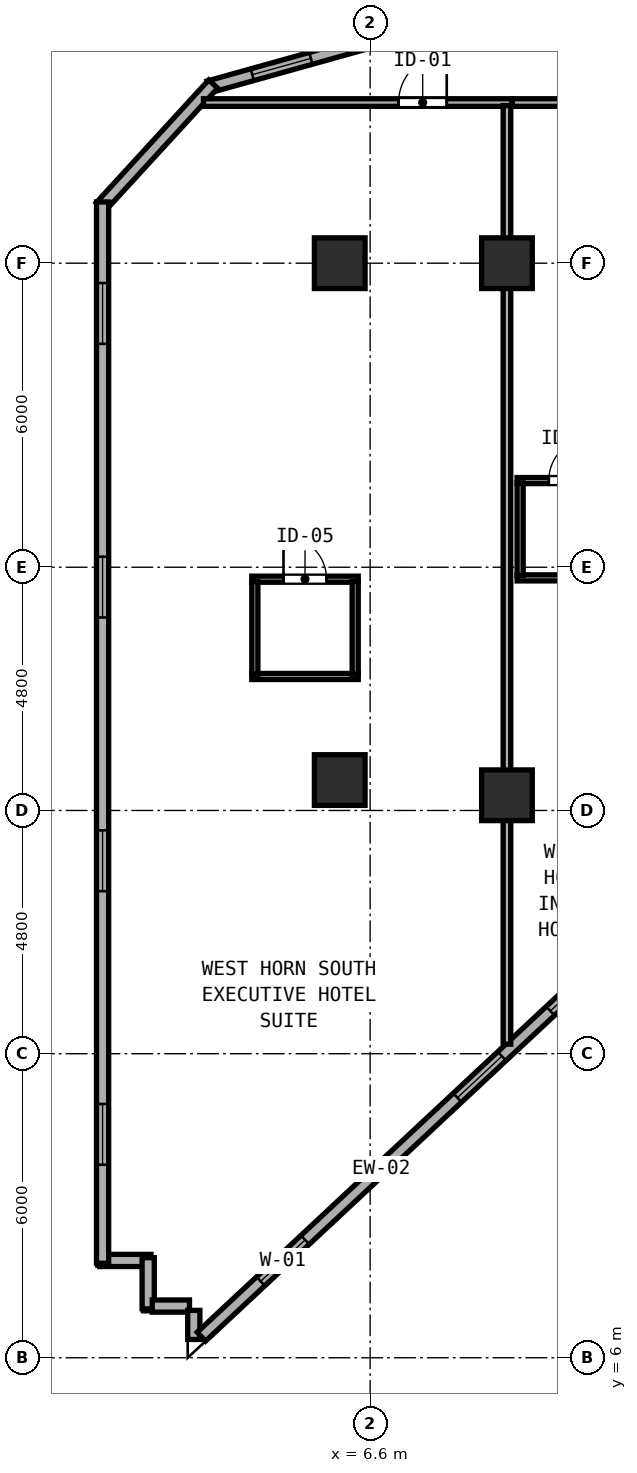
"""IFC4 building model, lengths in metres.
Left out: names, types, materials, properties, quantities, classifications, styles, units other than length and angle.
Written with IfcOpenShell. Run it as: python <this file> out.ifc"""

import sys

from ifc_helpers import new_model, si_unit, direction, frame, frame_2d, origin, origin_2d, place, context, subcontext, project, spatial, rectangle, hollow_rectangle, extrude, element, fill, save


model = new_model("IFC4")
c1 = context("Model", 3, precision=1e-05, world=origin(), true_north=direction((0.0, 1.0)))
c2 = subcontext(c1, "Body", "Model", "MODEL_VIEW")
j1 = project(units=[si_unit("LENGTHUNIT", "METRE"), si_unit("PLANEANGLEUNIT", "RADIAN")], contexts=[c1])
p1 = place(None, origin())
s1 = spatial("IfcSite", under=j1, at=p1, CompositionType="ELEMENT")
p2 = place(p1, origin())
s2 = spatial("IfcBuilding", under=s1, at=p2, CompositionType="ELEMENT")
p3 = place(p2, frame((0.0, 0.0, 78.0)))
s3 = spatial("IfcBuildingStorey", under=s2, at=p3, CompositionType="ELEMENT", Elevation=78.0)
for number, where, z_axis, x_axis in (
    (1, (6.0, 17.4, 0.0), (0.0, 0.0, 1.0), (1.0, 0.0, 0.0)),
    (2, (6.0, 27.6, 0.0), (0.0, 0.0, 1.0), (1.0, 0.0, 0.0)),
    (3, (9.3, 17.1, 0.0), (0.0, 0.0, 1.0), (1.0, 0.0, 0.0)),
    (4, (9.3, 27.6, 0.0), (0.0, 0.0, 1.0), (1.0, 0.0, 0.0)),
):
    element("IfcColumn", number, at=place(p3, frame(where, z_axis=z_axis, x_axis=x_axis)), inside=s3, PredefinedType="COLUMN", context=c2, shape_type="SweptSolid", body=[
        extrude(hollow_rectangle(XDim=1.0, YDim=1.0, WallThickness=0.038, at=origin_2d()), origin(), (0.0, 0.0, 1.0), 3.8),
    ])
for number, where, z_axis, x_axis in (
    (5, (1.265, 7.92, 0.0), (0.0, 0.0, 1.0), (1.0, 0.0, 0.0)),
    (6, (2.22, 7.975, 0.0), (0.0, 0.0, 1.0), (0.0, -1.0, 0.0)),
):
    element("IfcWall", number, at=place(p3, frame(where, z_axis=z_axis, x_axis=x_axis)), inside=s3, PredefinedType="SOLIDWALL", context=c2, shape_type="SweptSolid", body=[
        extrude(rectangle(XDim=1.01, YDim=0.24, at=frame_2d((0.505, 0.0))), origin(), (0.0, 0.0, 1.0), 3.6),
    ])
p4 = place(p3, frame((2.3, 7.02, 0.0), z_axis=(0.0, 0.0, 1.0), x_axis=(1.0, 0.0, 0.0)))
e7 = element("IfcWall", 7, at=p4, inside=s3, PredefinedType="SOLIDWALL", context=c2, shape_type="SweptSolid", body=[
    extrude(rectangle(XDim=0.735, YDim=0.24, at=frame_2d((0.367, 0.0))), origin(), (0.0, 0.0, 1.0), 3.6),
])
p5 = place(p3, frame((3.12, 6.935, 0.0), z_axis=(0.0, 0.0, 1.0), x_axis=(0.0, -1.0, 0.0)))
e8 = element("IfcWall", 8, at=p5, inside=s3, PredefinedType="SOLIDWALL", context=c2, shape_type="SweptSolid", body=[
    extrude(rectangle(XDim=0.574, YDim=0.24, at=frame_2d((0.287, 0.0))), origin(), (0.0, 0.0, 1.0), 3.6),
])
p6 = place(p3, frame((3.27, 6.416, 0.0), z_axis=(0.0, 0.0, 1.0), x_axis=(0.731064187858, 0.682308693505, 0.0)))
e9 = element("IfcWall", 9, at=p6, inside=s3, PredefinedType="SOLIDWALL", context=c2, shape_type="SweptSolid", body=[
    extrude(rectangle(XDim=11.833, YDim=0.24, at=frame_2d((5.916, 0.0))), origin(), (0.0, 0.0, 1.0), 3.6),
])
p7 = place(p6, frame((1.6, 0.0, 0.85)))
e10 = element("IfcOpeningElement", 10, at=p7, cuts=e9, PredefinedType="OPENING", context=c2, shape_type="SweptSolid", body=[
    extrude(rectangle(XDim=1.2, YDim=1.85, at=frame_2d((0.6, 0.925))), frame((0.0, 0.13, 0.0), z_axis=(0.0, -1.0, 0.0), x_axis=(1.0, 0.0, 0.0)), (0.0, 0.0, 1.0), 0.26),
])
p8 = place(p6, frame((6.912, 0.0, 0.85)))
e11 = element("IfcOpeningElement", 11, at=p8, cuts=e9, PredefinedType="OPENING", context=c2, shape_type="SweptSolid", body=[
    extrude(rectangle(XDim=1.2, YDim=1.85, at=frame_2d((0.6, 0.925))), frame((0.0, 0.13, 0.0), z_axis=(0.0, -1.0, 0.0), x_axis=(1.0, 0.0, 0.0)), (0.0, 0.0, 1.0), 0.26),
])
p9 = place(p6, frame((9.421, 0.0, 0.85)))
e12 = element("IfcOpeningElement", 12, at=p9, cuts=e9, PredefinedType="OPENING", context=c2, shape_type="SweptSolid", body=[
    extrude(rectangle(XDim=1.2, YDim=1.85, at=frame_2d((0.6, 0.925))), frame((0.0, 0.13, 0.0), z_axis=(0.0, -1.0, 0.0), x_axis=(1.0, 0.0, 0.0)), (0.0, 0.0, 1.0), 0.26),
])
p10 = place(p3, frame((12.173, 33.524, 0.0), z_axis=(0.0, 0.0, 1.0), x_axis=(-0.963197271032, -0.268795493036, 0.0)))
e13 = element("IfcWall", 13, at=p10, inside=s3, PredefinedType="SOLIDWALL", context=c2, shape_type="SweptSolid", body=[
    extrude(rectangle(XDim=9.095, YDim=0.24, at=frame_2d((4.548, 0.0))), origin(), (0.0, 0.0, 1.0), 3.6),
])
p11 = place(p10, frame((1.6, 0.0, 0.85)))
e14 = element("IfcOpeningElement", 14, at=p11, cuts=e13, PredefinedType="OPENING", context=c2, shape_type="SweptSolid", body=[
    extrude(rectangle(XDim=1.2, YDim=1.85, at=frame_2d((0.6, 0.925))), frame((0.0, 0.13, 0.0), z_axis=(0.0, -1.0, 0.0), x_axis=(1.0, 0.0, 0.0)), (0.0, 0.0, 1.0), 0.26),
])
p12 = place(p10, frame((7.0, 0.0, 0.85)))
e15 = element("IfcOpeningElement", 15, at=p12, cuts=e13, PredefinedType="OPENING", context=c2, shape_type="SweptSolid", body=[
    extrude(rectangle(XDim=1.2, YDim=1.85, at=frame_2d((0.6, 0.925))), frame((0.0, 0.13, 0.0), z_axis=(0.0, -1.0, 0.0), x_axis=(1.0, 0.0, 0.0)), (0.0, 0.0, 1.0), 0.26),
])
p13 = place(p3, frame((3.502, 31.134, 0.0), z_axis=(0.0, 0.0, 1.0), x_axis=(-0.675781844312, -0.737101688302, 0.0)))
e16 = element("IfcWall", 16, at=p13, inside=s3, PredefinedType="SOLIDWALL", context=c2, shape_type="SweptSolid", body=[
    extrude(rectangle(XDim=3.285, YDim=0.24, at=frame_2d((1.642, 0.0))), origin(), (0.0, 0.0, 1.0), 3.6),
])
p14 = place(p3, frame((1.32, 28.808, 0.0), z_axis=(0.0, 0.0, 1.0), x_axis=(0.0, -1.0, 0.0)))
e17 = element("IfcWall", 17, at=p14, inside=s3, PredefinedType="SOLIDWALL", context=c2, shape_type="SweptSolid", body=[
    extrude(rectangle(XDim=20.943, YDim=0.24, at=frame_2d((10.472, 0.0))), origin(), (0.0, 0.0, 1.0), 3.6),
])
p15 = place(p14, frame((1.6, 0.0, 0.85)))
e18 = element("IfcOpeningElement", 18, at=p15, cuts=e17, PredefinedType="OPENING", context=c2, shape_type="SweptSolid", body=[
    extrude(rectangle(XDim=1.2, YDim=1.85, at=frame_2d((0.6, 0.925))), frame((0.0, 0.13, 0.0), z_axis=(0.0, -1.0, 0.0), x_axis=(1.0, 0.0, 0.0)), (0.0, 0.0, 1.0), 0.26),
])
p16 = place(p14, frame((7.0, 0.0, 0.85)))
e19 = element("IfcOpeningElement", 19, at=p16, cuts=e17, PredefinedType="OPENING", context=c2, shape_type="SweptSolid", body=[
    extrude(rectangle(XDim=1.2, YDim=1.85, at=frame_2d((0.6, 0.925))), frame((0.0, 0.13, 0.0), z_axis=(0.0, -1.0, 0.0), x_axis=(1.0, 0.0, 0.0)), (0.0, 0.0, 1.0), 0.26),
])
p17 = place(p14, frame((12.4, 0.0, 0.85)))
e20 = element("IfcOpeningElement", 20, at=p17, cuts=e17, PredefinedType="OPENING", context=c2, shape_type="SweptSolid", body=[
    extrude(rectangle(XDim=1.2, YDim=1.85, at=frame_2d((0.6, 0.925))), frame((0.0, 0.13, 0.0), z_axis=(0.0, -1.0, 0.0), x_axis=(1.0, 0.0, 0.0)), (0.0, 0.0, 1.0), 0.26),
])
p18 = place(p14, frame((17.8, 0.0, 0.85)))
e21 = element("IfcOpeningElement", 21, at=p18, cuts=e17, PredefinedType="OPENING", context=c2, shape_type="SweptSolid", body=[
    extrude(rectangle(XDim=1.2, YDim=1.85, at=frame_2d((0.6, 0.925))), frame((0.0, 0.13, 0.0), z_axis=(0.0, -1.0, 0.0), x_axis=(1.0, 0.0, 0.0)), (0.0, 0.0, 1.0), 0.26),
])
p19 = place(p3, frame((3.311, 30.77, 0.0), z_axis=(0.0, 0.0, 1.0), x_axis=(1.0, 0.0, 0.0)))
e22 = element("IfcWall", 22, at=p19, inside=s3, PredefinedType="PARTITIONING", context=c2, shape_type="SweptSolid", body=[
    extrude(rectangle(XDim=6.089, YDim=0.15, at=frame_2d((3.044, 0.0))), origin(), (0.0, 0.0, 1.0), 3.6),
])
p20 = place(p19, frame((4.801, 0.0, 0.0), z_axis=(0.0, 0.0, 1.0), x_axis=(-1.0, 0.0, 0.0)))
e23 = element("IfcOpeningElement", 23, at=p20, cuts=e22, PredefinedType="OPENING", context=c2, shape_type="SweptSolid", body=[
    extrude(rectangle(XDim=0.95, YDim=2.18, at=frame_2d((0.475, 1.09))), frame((0.0, 0.085, 0.0), z_axis=(0.0, -1.0, 0.0), x_axis=(1.0, 0.0, 0.0)), (0.0, 0.0, 1.0), 0.17),
])
p21 = place(p3, frame((9.3, 12.188, 0.0), z_axis=(0.0, 0.0, 1.0), x_axis=(0.0, 1.0, 0.0)))
e24 = element("IfcWall", 24, at=p21, inside=s3, PredefinedType="PARTITIONING", context=c2, shape_type="SweptSolid", body=[
    extrude(rectangle(XDim=18.522, YDim=0.15, at=frame_2d((9.261, 0.0))), origin(), (0.0, 0.0, 1.0), 3.6),
])
p22 = place(p3, frame((4.265, 21.364, 0.0), z_axis=(0.0, 0.0, 1.0), x_axis=(1.0, 0.0, 0.0)))
e25 = element("IfcWall", 25, at=p22, inside=s3, PredefinedType="PARTITIONING", context=c2, shape_type="SweptSolid", body=[
    extrude(rectangle(XDim=2.1, YDim=0.12, at=frame_2d((1.05, 0.0))), origin(), (0.0, 0.0, 1.0), 3.6),
])
p23 = place(p22, frame((1.475, 0.0, 0.0), z_axis=(0.0, 0.0, 1.0), x_axis=(-1.0, 0.0, 0.0)))
e26 = element("IfcOpeningElement", 26, at=p23, cuts=e25, PredefinedType="OPENING", context=c2, shape_type="SweptSolid", body=[
    extrude(rectangle(XDim=0.85, YDim=2.1, at=frame_2d((0.425, 1.05))), frame((0.0, 0.07, 0.0), z_axis=(0.0, -1.0, 0.0), x_axis=(1.0, 0.0, 0.0)), (0.0, 0.0, 1.0), 0.14),
])
p24 = place(p3, frame((4.265, 19.444, 0.0), z_axis=(0.0, 0.0, 1.0), x_axis=(1.0, 0.0, 0.0)))
e27 = element("IfcWall", 27, at=p24, inside=s3, PredefinedType="PARTITIONING", context=c2, shape_type="SweptSolid", body=[
    extrude(rectangle(XDim=2.1, YDim=0.12, at=frame_2d((1.05, 0.0))), origin(), (0.0, 0.0, 1.0), 3.6),
])
for number, where, z_axis, x_axis in (
    (28, (4.325, 19.489, 0.0), (0.0, 0.0, 1.0), (0.0, 1.0, 0.0)),
    (29, (6.305, 19.489, 0.0), (0.0, 0.0, 1.0), (0.0, 1.0, 0.0)),
):
    element("IfcWall", number, at=place(p3, frame(where, z_axis=z_axis, x_axis=x_axis)), inside=s3, PredefinedType="PARTITIONING", context=c2, shape_type="SweptSolid", body=[
        extrude(rectangle(XDim=1.83, YDim=0.12, at=frame_2d((0.915, 0.0))), origin(), (0.0, 0.0, 1.0), 3.6),
    ])
p25 = place(p3, frame((9.402, 30.77, 0.0), z_axis=(0.0, 0.0, 1.0), x_axis=(1.0, 0.0, 0.0)))
e30 = element("IfcWall", 30, at=p25, inside=s3, PredefinedType="PARTITIONING", context=c2, shape_type="SweptSolid", body=[
    extrude(rectangle(XDim=2.296, YDim=0.15, at=frame_2d((1.148, 0.0))), origin(), (0.0, 0.0, 1.0), 3.6),
])
p26 = place(p25, frame((1.934, 0.0, 0.0), z_axis=(0.0, 0.0, 1.0), x_axis=(-1.0, 0.0, 0.0)))
e31 = element("IfcOpeningElement", 31, at=p26, cuts=e30, PredefinedType="OPENING", context=c2, shape_type="SweptSolid", body=[
    extrude(rectangle(XDim=0.95, YDim=2.15, at=frame_2d((0.475, 1.075))), frame((0.0, 0.085, 0.0), z_axis=(0.0, -1.0, 0.0), x_axis=(1.0, 0.0, 0.0)), (0.0, 0.0, 1.0), 0.17),
])
p27 = place(p3, frame((9.5, 23.31, 0.0), z_axis=(0.0, 0.0, 1.0), x_axis=(1.0, 0.0, 0.0)))
e32 = element("IfcWall", 32, at=p27, inside=s3, PredefinedType="PARTITIONING", context=c2, shape_type="SweptSolid", body=[
    extrude(rectangle(XDim=2.1, YDim=0.12, at=frame_2d((1.05, 0.0))), origin(), (0.0, 0.0, 1.0), 3.6),
])
p28 = place(p27, frame((1.475, 0.0, 0.0), z_axis=(0.0, 0.0, 1.0), x_axis=(-1.0, 0.0, 0.0)))
e33 = element("IfcOpeningElement", 33, at=p28, cuts=e32, PredefinedType="OPENING", context=c2, shape_type="SweptSolid", body=[
    extrude(rectangle(XDim=0.85, YDim=2.1, at=frame_2d((0.425, 1.05))), frame((0.0, 0.07, 0.0), z_axis=(0.0, -1.0, 0.0), x_axis=(1.0, 0.0, 0.0)), (0.0, 0.0, 1.0), 0.14),
])
p29 = place(p3, frame((9.5, 21.39, 0.0), z_axis=(0.0, 0.0, 1.0), x_axis=(1.0, 0.0, 0.0)))
e34 = element("IfcWall", 34, at=p29, inside=s3, PredefinedType="PARTITIONING", context=c2, shape_type="SweptSolid", body=[
    extrude(rectangle(XDim=2.1, YDim=0.12, at=frame_2d((1.05, 0.0))), origin(), (0.0, 0.0, 1.0), 3.6),
])
p30 = place(p3, frame((9.56, 21.435, 0.0), z_axis=(0.0, 0.0, 1.0), x_axis=(0.0, 1.0, 0.0)))
e35 = element("IfcWall", 35, at=p30, inside=s3, PredefinedType="PARTITIONING", context=c2, shape_type="SweptSolid", body=[
    extrude(rectangle(XDim=1.83, YDim=0.12, at=frame_2d((0.915, 0.0))), origin(), (0.0, 0.0, 1.0), 3.6),
])
p31 = place(p7, origin())
e36 = element("IfcWindow", 36, at=p31, inside=s3, PartitioningType="SINGLE_PANEL", PredefinedType="WINDOW", context=c2, shape_type="SweptSolid", body=[
    extrude(rectangle(XDim=1.2, YDim=1.85, at=frame_2d((0.6, 0.925))), frame((0.0, 0.03, 0.0), z_axis=(0.0, -1.0, 0.0), x_axis=(1.0, 0.0, 0.0)), (0.0, 0.0, 1.0), 0.06),
])
fill(e10, e36)
p32 = place(p8, origin())
e37 = element("IfcWindow", 37, at=p32, inside=s3, PartitioningType="SINGLE_PANEL", PredefinedType="WINDOW", context=c2, shape_type="SweptSolid", body=[
    extrude(rectangle(XDim=1.2, YDim=1.85, at=frame_2d((0.6, 0.925))), frame((0.0, 0.03, 0.0), z_axis=(0.0, -1.0, 0.0), x_axis=(1.0, 0.0, 0.0)), (0.0, 0.0, 1.0), 0.06),
])
fill(e11, e37)
p33 = place(p12, origin())
e38 = element("IfcWindow", 38, at=p33, inside=s3, PartitioningType="SINGLE_PANEL", PredefinedType="WINDOW", context=c2, shape_type="SweptSolid", body=[
    extrude(rectangle(XDim=1.2, YDim=1.85, at=frame_2d((0.6, 0.925))), frame((0.0, 0.03, 0.0), z_axis=(0.0, -1.0, 0.0), x_axis=(1.0, 0.0, 0.0)), (0.0, 0.0, 1.0), 0.06),
])
fill(e15, e38)
p34 = place(p15, origin())
e39 = element("IfcWindow", 39, at=p34, inside=s3, PartitioningType="SINGLE_PANEL", PredefinedType="WINDOW", context=c2, shape_type="SweptSolid", body=[
    extrude(rectangle(XDim=1.2, YDim=1.85, at=frame_2d((0.6, 0.925))), frame((0.0, 0.03, 0.0), z_axis=(0.0, -1.0, 0.0), x_axis=(1.0, 0.0, 0.0)), (0.0, 0.0, 1.0), 0.06),
])
fill(e18, e39)
p35 = place(p16, origin())
e40 = element("IfcWindow", 40, at=p35, inside=s3, PartitioningType="SINGLE_PANEL", PredefinedType="WINDOW", context=c2, shape_type="SweptSolid", body=[
    extrude(rectangle(XDim=1.2, YDim=1.85, at=frame_2d((0.6, 0.925))), frame((0.0, 0.03, 0.0), z_axis=(0.0, -1.0, 0.0), x_axis=(1.0, 0.0, 0.0)), (0.0, 0.0, 1.0), 0.06),
])
fill(e19, e40)
p36 = place(p17, origin())
e41 = element("IfcWindow", 41, at=p36, inside=s3, PartitioningType="SINGLE_PANEL", PredefinedType="WINDOW", context=c2, shape_type="SweptSolid", body=[
    extrude(rectangle(XDim=1.2, YDim=1.85, at=frame_2d((0.6, 0.925))), frame((0.0, 0.03, 0.0), z_axis=(0.0, -1.0, 0.0), x_axis=(1.0, 0.0, 0.0)), (0.0, 0.0, 1.0), 0.06),
])
fill(e20, e41)
p37 = place(p18, origin())
e42 = element("IfcWindow", 42, at=p37, inside=s3, PartitioningType="SINGLE_PANEL", PredefinedType="WINDOW", context=c2, shape_type="SweptSolid", body=[
    extrude(rectangle(XDim=1.2, YDim=1.85, at=frame_2d((0.6, 0.925))), frame((0.0, 0.03, 0.0), z_axis=(0.0, -1.0, 0.0), x_axis=(1.0, 0.0, 0.0)), (0.0, 0.0, 1.0), 0.06),
])
fill(e21, e42)
p38 = place(p20, origin())
e43 = element("IfcDoor", 43, at=p38, inside=s3, OperationType="SINGLE_SWING_LEFT", PredefinedType="DOOR", context=c2, shape_type="SweptSolid", body=[
    extrude(rectangle(XDim=0.95, YDim=2.18, at=frame_2d((0.475, 1.09))), frame((0.0, 0.025, 0.0), z_axis=(0.0, -1.0, 0.0), x_axis=(1.0, 0.0, 0.0)), (0.0, 0.0, 1.0), 0.05),
])
fill(e23, e43)
p39 = place(p23, origin())
e44 = element("IfcDoor", 44, at=p39, inside=s3, OperationType="SINGLE_SWING_RIGHT", PredefinedType="DOOR", context=c2, shape_type="SweptSolid", body=[
    extrude(rectangle(XDim=0.85, YDim=2.1, at=frame_2d((0.425, 1.05))), frame((0.0, 0.025, 0.0), z_axis=(0.0, -1.0, 0.0), x_axis=(1.0, 0.0, 0.0)), (0.0, 0.0, 1.0), 0.05),
])
fill(e26, e44)
p40 = place(p28, origin())
e45 = element("IfcDoor", 45, at=p40, inside=s3, OperationType="SINGLE_SWING_LEFT", PredefinedType="DOOR", context=c2, shape_type="SweptSolid", body=[
    extrude(rectangle(XDim=0.85, YDim=2.1, at=frame_2d((0.425, 1.05))), frame((0.0, 0.025, 0.0), z_axis=(0.0, -1.0, 0.0), x_axis=(1.0, 0.0, 0.0)), (0.0, 0.0, 1.0), 0.05),
])
fill(e33, e45)
p41 = place(p9, origin())
e46 = element("IfcWindow", 46, at=p41, inside=s3, PartitioningType="SINGLE_PANEL", PredefinedType="WINDOW", context=c2, shape_type="SweptSolid", body=[
    extrude(rectangle(XDim=1.2, YDim=1.85, at=frame_2d((0.6, 0.925))), frame((0.0, 0.03, 0.0), z_axis=(0.0, -1.0, 0.0), x_axis=(1.0, 0.0, 0.0)), (0.0, 0.0, 1.0), 0.06),
])
fill(e12, e46)
save(model, sys.argv[1])
